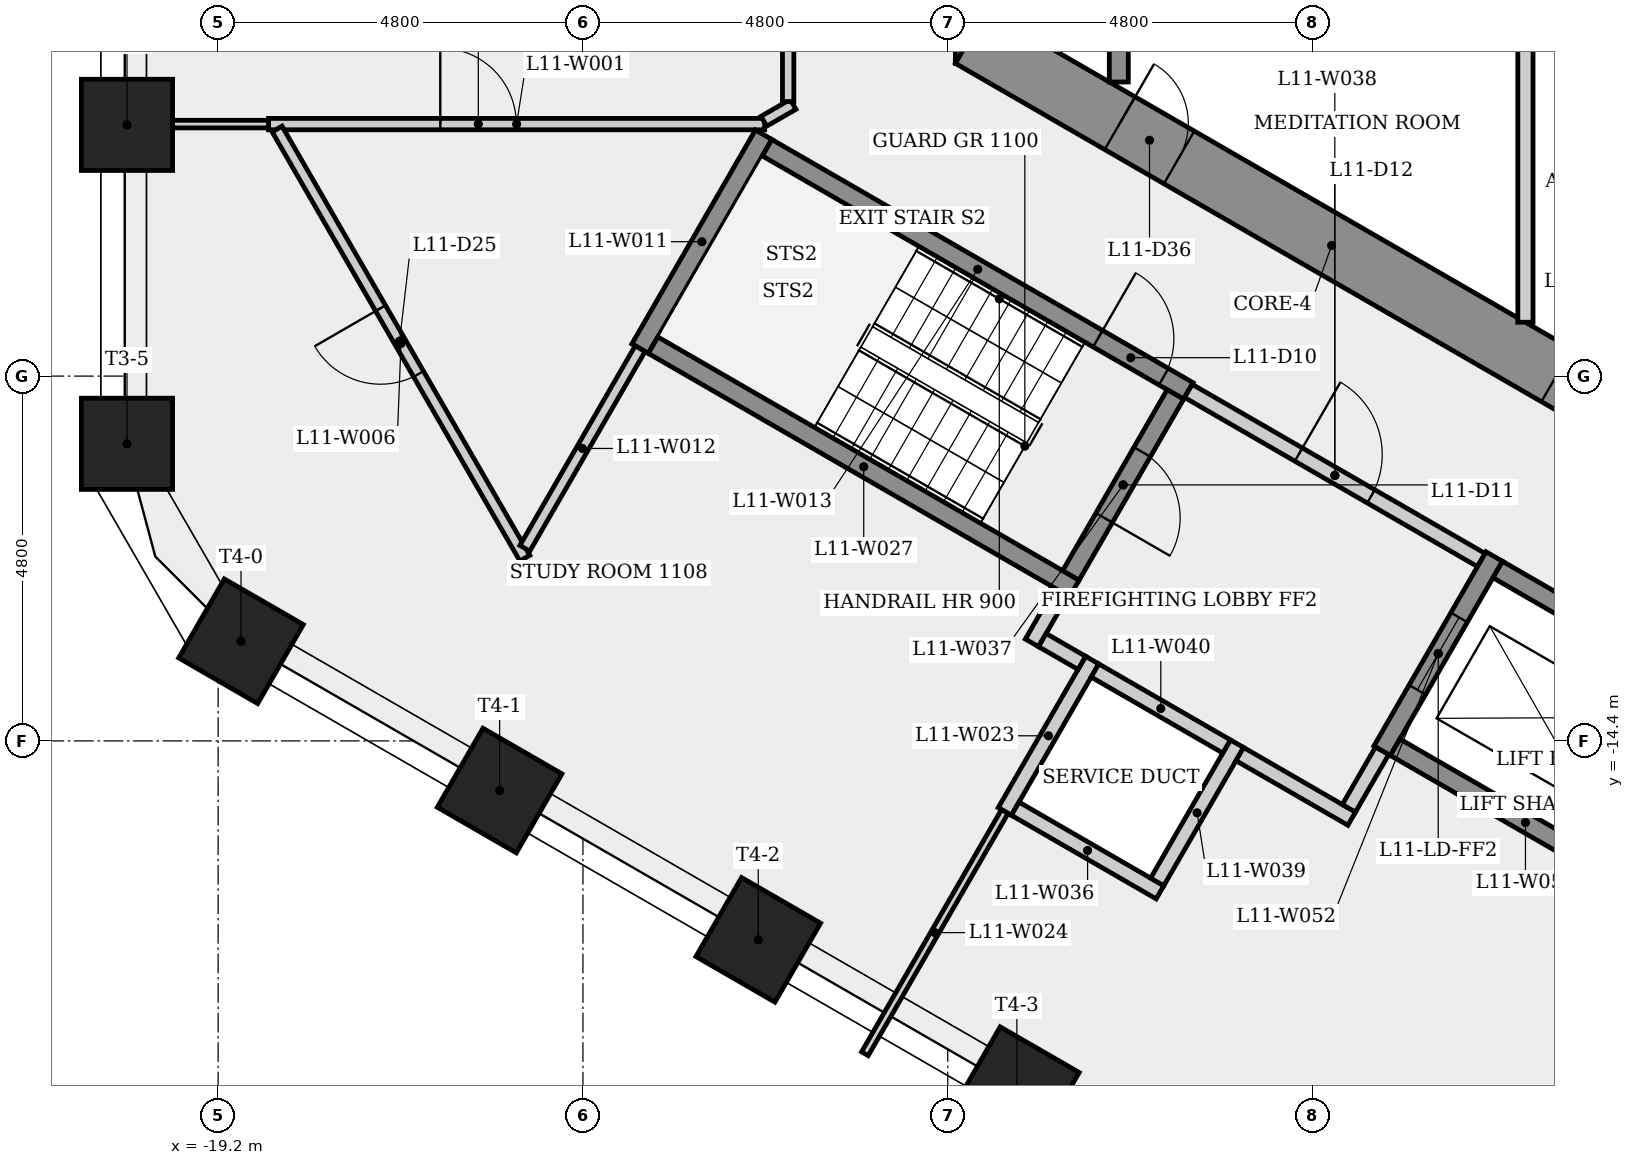
"""IFC4 building model, lengths in metres.
Left out: names, types, materials, properties, quantities, classifications, styles, units other than length and angle.
Written with IfcOpenShell. Run it as: python <this file> out.ifc"""

import sys

from ifc_helpers import new_model, si_unit, direction, frame, frame_2d, origin, origin_2d, place, context, subcontext, project, spatial, rectangle, extrude, element, fill, save


model = new_model("IFC4")
c1 = context("Model", 3, precision=1e-05, world=origin(), true_north=direction((0.0, 1.0)))
c2 = subcontext(c1, "Body", "Model", "MODEL_VIEW")
j1 = project(units=[si_unit("LENGTHUNIT", "METRE"), si_unit("PLANEANGLEUNIT", "RADIAN")], contexts=[c1])
p1 = place(None, origin())
s1 = spatial("IfcSite", under=j1, at=p1, CompositionType="ELEMENT")
p2 = place(p1, origin())
s2 = spatial("IfcBuilding", under=s1, at=p2, CompositionType="ELEMENT")
p3 = place(p2, frame((0.0, 0.0, 45.9)))
s3 = spatial("IfcBuildingStorey", under=s2, at=p3, CompositionType="ELEMENT", Elevation=45.9)
p4 = place(p3, frame((-9.1, 5.485, 0.0), z_axis=(0.0, 0.0, 1.0), x_axis=(0.0, -1.0, 0.0)))
e1 = element("IfcWall", 1, at=p4, inside=s3, PredefinedType="SHEAR", context=c2, shape_type="SweptSolid", body=[
    extrude(rectangle(XDim=10.97, YDim=0.8, at=frame_2d((5.485, 0.0))), origin(), (0.0, 0.0, 1.0), 3.4),
])
p5 = place(p4, frame((4.685, 0.0, 0.0)))
e2 = element("IfcOpeningElement", 2, at=p5, cuts=e1, PredefinedType="OPENING", context=c2, shape_type="SweptSolid", body=[
    extrude(rectangle(XDim=1.6, YDim=2.1, at=frame_2d((0.8, 1.05))), frame((0.0, 0.41, 0.0), z_axis=(0.0, -1.0, 0.0), x_axis=(1.0, 0.0, 0.0)), (0.0, 0.0, 1.0), 0.82),
])
p6 = place(p3, frame((-9.3, -5.138, 0.0), z_axis=(0.0, 0.0, 1.0), x_axis=(0.866023993627, -0.500002442456, 0.0)))
e3 = element("IfcWall", 3, at=p6, inside=s3, PredefinedType="SHEAR", context=c2, shape_type="SweptSolid", body=[
    extrude(rectangle(XDim=10.97, YDim=0.8, at=frame_2d((5.485, 0.0))), origin(), (0.0, 0.0, 1.0), 3.4),
])
p7 = place(p6, frame((2.268, 0.0, 0.0)))
e4 = element("IfcOpeningElement", 4, at=p7, cuts=e3, PredefinedType="OPENING", context=c2, shape_type="SweptSolid", body=[
    extrude(rectangle(XDim=0.9, YDim=2.1, at=frame_2d((0.45, 1.05))), frame((0.0, 0.41, 0.0), z_axis=(0.0, -1.0, 0.0), x_axis=(1.0, 0.0, 0.0)), (0.0, 0.0, 1.0), 0.82),
])
p8 = place(p6, frame((8.903, 0.0, 0.0)))
e5 = element("IfcOpeningElement", 5, at=p8, cuts=e3, PredefinedType="OPENING", context=c2, shape_type="SweptSolid", body=[
    extrude(rectangle(XDim=0.9, YDim=2.1, at=frame_2d((0.45, 1.05))), frame((0.0, 0.41, 0.0), z_axis=(0.0, -1.0, 0.0), x_axis=(1.0, 0.0, 0.0)), (0.0, 0.0, 1.0), 0.82),
])
for number, where, z_axis, x_axis in (
    (6, (-20.399, -6.294, 0.0), (0.0, 0.0, 1.0), (-1.0, 0.0, 0.0)),
    (7, (-20.399, -10.491, 0.0), (0.0, 0.0, 1.0), (-1.0, 0.0, 0.0)),
    (8, (-18.899, -13.089, 0.0), (0.0, 0.0, 1.0), (-0.5, -0.866, 0.0)),
    (9, (-15.496, -15.053, 0.0), (0.0, 0.0, 1.0), (-0.5, -0.866, 0.0)),
    (10, (-12.094, -17.018, 0.0), (0.0, 0.0, 1.0), (-0.5, -0.866, 0.0)),
    (11, (-8.691, -18.982, 0.0), (0.0, 0.0, 1.0), (-0.5, -0.866, 0.0)),
):
    element("IfcColumn", number, at=place(p3, frame(where, z_axis=z_axis, x_axis=x_axis)), inside=s3, PredefinedType="COLUMN", context=c2, shape_type="SweptSolid", body=[
        extrude(rectangle(XDim=1.2, YDim=1.2, at=origin_2d()), origin(), (0.0, 0.0, 1.0), 3.4),
    ])
p9 = place(p3, frame((-18.537, -6.284, 0.0), z_axis=(0.0, 0.0, 1.0), x_axis=(1.0, 0.0, 0.0)))
e12 = element("IfcWall", 12, at=p9, inside=s3, PredefinedType="PARTITIONING", context=c2, shape_type="SweptSolid", body=[
    extrude(rectangle(XDim=6.527, YDim=0.15, at=frame_2d((3.264, 0.0))), origin(), (0.0, 0.0, 1.0), 3.05),
])
p10 = place(p9, frame((2.26, 0.0, 0.0)))
e13 = element("IfcOpeningElement", 13, at=p10, cuts=e12, PredefinedType="OPENING", context=c2, shape_type="SweptSolid", body=[
    extrude(rectangle(XDim=1.0, YDim=2.1, at=frame_2d((0.5, 1.05))), frame((0.0, 0.085, 0.0), z_axis=(0.0, -1.0, 0.0), x_axis=(1.0, 0.0, 0.0)), (0.0, 0.0, 1.0), 0.17),
])
p11 = place(p3, frame((-18.537, -6.284, 0.0), z_axis=(0.0, 0.0, 1.0), x_axis=(-1.0, 0.0, 0.0)))
e14 = element("IfcWall", 14, at=p11, inside=s3, PredefinedType="PARTITIONING", context=c2, shape_type="SweptSolid", body=[
    extrude(rectangle(XDim=1.892, YDim=0.1, at=frame_2d((0.946, 0.0))), origin(), (0.0, 0.0, 1.0), 3.05),
])
p12 = place(p3, frame((-15.164, -11.995, 0.0), z_axis=(0.0, 0.0, 1.0), x_axis=(-0.499989336744, 0.866031560131, 0.0)))
e15 = element("IfcWall", 15, at=p12, inside=s3, PredefinedType="PARTITIONING", context=c2, shape_type="SweptSolid", body=[
    extrude(rectangle(XDim=6.52, YDim=0.15, at=frame_2d((3.26, 0.0))), origin(), (0.0, 0.0, 1.0), 3.05),
])
p13 = place(p12, frame((2.797, 0.0, 0.0)))
e16 = element("IfcOpeningElement", 16, at=p13, cuts=e15, PredefinedType="OPENING", context=c2, shape_type="SweptSolid", body=[
    extrude(rectangle(XDim=1.0, YDim=2.1, at=frame_2d((0.5, 1.05))), frame((0.0, 0.085, 0.0), z_axis=(0.0, -1.0, 0.0), x_axis=(1.0, 0.0, 0.0)), (0.0, 0.0, 1.0), 0.17),
])
p14 = place(p3, frame((-13.648, -9.239, 0.0), z_axis=(0.0, 0.0, 1.0), x_axis=(0.500017246033, 0.866015446554, 0.0)))
e17 = element("IfcWall", 17, at=p14, inside=s3, PredefinedType="SHEAR", context=c2, shape_type="SweptSolid", body=[
    extrude(rectangle(XDim=3.25, YDim=0.25, at=frame_2d((1.625, 0.0))), origin(), (0.0, 0.0, 1.0), 3.05),
])
p15 = place(p3, frame((-13.648, -9.239, 0.0), z_axis=(0.0, 0.0, 1.0), x_axis=(-0.500017413604, -0.866015349802, 0.0)))
e18 = element("IfcWall", 18, at=p15, inside=s3, PredefinedType="PARTITIONING", context=c2, shape_type="SweptSolid", body=[
    extrude(rectangle(XDim=3.033, YDim=0.15, at=frame_2d((1.517, 0.0))), origin(), (0.0, 0.0, 1.0), 3.05),
])
p16 = place(p3, frame((-11.977, -6.595, 0.0), z_axis=(0.0, 0.0, 1.0), x_axis=(0.866025499775, -0.499999833739, 0.0)))
e19 = element("IfcWall", 19, at=p16, inside=s3, PredefinedType="SHEAR", context=c2, shape_type="SweptSolid", body=[
    extrude(rectangle(XDim=6.4, YDim=0.25, at=frame_2d((3.2, 0.0))), origin(), (0.0, 0.0, 1.0), 3.05),
])
p17 = place(p16, frame((5.025, 0.0, 0.0)))
e20 = element("IfcOpeningElement", 20, at=p17, cuts=e19, PredefinedType="OPENING", context=c2, shape_type="SweptSolid", body=[
    extrude(rectangle(XDim=1.0, YDim=2.1, at=frame_2d((0.5, 1.05))), frame((0.0, 0.135, 0.0), z_axis=(0.0, -1.0, 0.0), x_axis=(1.0, 0.0, 0.0)), (0.0, 0.0, 1.0), 0.27),
])
p18 = place(p3, frame((-12.02, -6.247, 0.0), z_axis=(0.0, 0.0, 1.0), x_axis=(0.866103179807, 0.499865263774, 0.0)))
e21 = element("IfcWall", 21, at=p18, inside=s3, PredefinedType="PARTITIONING", context=c2, shape_type="SweptSolid", body=[
    extrude(rectangle(XDim=0.444, YDim=0.15, at=frame_2d((0.222, 0.0))), origin(), (0.0, 0.0, 1.0), 3.05),
])
p19 = place(p3, frame((-11.7, 6.137, 0.0), z_axis=(0.0, 0.0, 1.0), x_axis=(0.0, -1.0, 0.0)))
e22 = element("IfcWall", 22, at=p19, inside=s3, PredefinedType="PARTITIONING", context=c2, shape_type="SweptSolid", body=[
    extrude(rectangle(XDim=12.125, YDim=0.15, at=frame_2d((6.062, 0.0))), origin(), (0.0, 0.0, 1.0), 3.05),
])
p20 = place(p19, frame((5.637, 0.0, 0.0)))
e23 = element("IfcOpeningElement", 23, at=p20, cuts=e22, PredefinedType="OPENING", context=c2, shape_type="SweptSolid", body=[
    extrude(rectangle(XDim=1.0, YDim=2.1, at=frame_2d((0.5, 1.05))), frame((0.0, 0.085, 0.0), z_axis=(0.0, -1.0, 0.0), x_axis=(1.0, 0.0, 0.0)), (0.0, 0.0, 1.0), 0.17),
])
p21 = place(p3, frame((-8.85, -15.329, 0.0), z_axis=(0.0, 0.0, 1.0), x_axis=(0.500077740698, 0.865980515519, 0.0)))
e24 = element("IfcWall", 24, at=p21, inside=s3, PredefinedType="PLUMBINGWALL", context=c2, shape_type="SweptSolid", body=[
    extrude(rectangle(XDim=2.3, YDim=0.2, at=frame_2d((1.15, 0.0))), origin(), (0.0, 0.0, 1.0), 3.05),
])
p22 = place(p3, frame((-8.85, -15.329, 0.0), z_axis=(0.0, 0.0, 1.0), x_axis=(-0.499955964762, -0.866050826049, 0.0)))
e25 = element("IfcWall", 25, at=p22, inside=s3, PredefinedType="PARTITIONING", context=c2, shape_type="SweptSolid", body=[
    extrude(rectangle(XDim=3.68, YDim=0.1, at=frame_2d((1.84, 0.0))), origin(), (0.0, 0.0, 1.0), 3.05),
])
p23 = place(p3, frame((-8.493, -13.11, 0.0), z_axis=(0.0, 0.0, 1.0), x_axis=(0.500067724834, 0.865986299303, 0.0)))
e26 = element("IfcWall", 26, at=p23, inside=s3, PredefinedType="PARTITIONING", context=c2, shape_type="SweptSolid", body=[
    extrude(rectangle(XDim=0.775, YDim=0.2, at=frame_2d((0.388, 0.0))), origin(), (0.0, 0.0, 1.0), 3.05),
])
p24 = place(p3, frame((-7.935, -12.393, 0.0), z_axis=(0.0, 0.0, 1.0), x_axis=(-0.866025499775, 0.499999833739, 0.0)))
e27 = element("IfcWall", 27, at=p24, inside=s3, PredefinedType="SHEAR", context=c2, shape_type="SweptSolid", body=[
    extrude(rectangle(XDim=6.4, YDim=0.25, at=frame_2d((3.2, 0.0))), origin(), (0.0, 0.0, 1.0), 3.05),
])
p25 = place(p3, frame((-7.836, -13.373, 0.0), z_axis=(0.0, 0.0, 1.0), x_axis=(-0.866232998003, 0.499640263761, 0.0)))
e28 = element("IfcWall", 28, at=p25, inside=s3, PredefinedType="PARTITIONING", context=c2, shape_type="SweptSolid", body=[
    extrude(rectangle(XDim=0.6, YDim=0.2, at=frame_2d((0.3, 0.0))), origin(), (0.0, 0.0, 1.0), 3.05),
])
p26 = place(p3, frame((-7.35, -5.73, 0.0), z_axis=(0.0, 0.0, 1.0), x_axis=(0.0, 1.0, 0.0)))
e29 = element("IfcWall", 29, at=p26, inside=s3, PredefinedType="SHEAR", context=c2, shape_type="SweptSolid", body=[
    extrude(rectangle(XDim=4.055, YDim=0.25, at=frame_2d((2.028, 0.0))), origin(), (0.0, 0.0, 1.0), 3.05),
])
p27 = place(p3, frame((-6.808, -16.392, 0.0), z_axis=(0.0, 0.0, 1.0), x_axis=(-0.866008176907, 0.50002983664, 0.0)))
e30 = element("IfcWall", 30, at=p27, inside=s3, PredefinedType="PLUMBINGWALL", context=c2, shape_type="SweptSolid", body=[
    extrude(rectangle(XDim=2.2, YDim=0.2, at=frame_2d((1.1, 0.0))), origin(), (0.0, 0.0, 1.0), 3.05),
])
p28 = place(p3, frame((-6.605, -9.841, 0.0), z_axis=(0.0, 0.0, 1.0), x_axis=(-0.499996545922, -0.866027397988, 0.0)))
e31 = element("IfcWall", 31, at=p28, inside=s3, PredefinedType="SHEAR", context=c2, shape_type="SweptSolid", body=[
    extrude(rectangle(XDim=2.75, YDim=0.25, at=frame_2d((1.375, 0.0))), origin(), (0.0, 0.0, 1.0), 3.05),
])
p29 = place(p28, frame((0.875, 0.0, 0.0)))
e32 = element("IfcOpeningElement", 32, at=p29, cuts=e31, PredefinedType="OPENING", context=c2, shape_type="SweptSolid", body=[
    extrude(rectangle(XDim=1.0, YDim=2.1, at=frame_2d((0.5, 1.05))), frame((0.0, 0.135, 0.0), z_axis=(0.0, -1.0, 0.0), x_axis=(1.0, 0.0, 0.0)), (0.0, 0.0, 1.0), 0.27),
])
p30 = place(p3, frame((-6.435, -9.795, 0.0), z_axis=(0.0, 0.0, 1.0), x_axis=(0.866012907634, -0.500021643343, 0.0)))
e33 = element("IfcWall", 33, at=p30, inside=s3, PredefinedType="PARTITIONING", context=c2, shape_type="SweptSolid", body=[
    extrude(rectangle(XDim=4.45, YDim=0.2, at=frame_2d((2.225, 0.0))), origin(), (0.0, 0.0, 1.0), 3.05),
])
p31 = place(p30, frame((1.675, 0.0, 0.0)))
e34 = element("IfcOpeningElement", 34, at=p31, cuts=e33, PredefinedType="OPENING", context=c2, shape_type="SweptSolid", body=[
    extrude(rectangle(XDim=1.1, YDim=2.1, at=frame_2d((0.55, 1.05))), frame((0.0, 0.11, 0.0), z_axis=(0.0, -1.0, 0.0), x_axis=(1.0, 0.0, 0.0)), (0.0, 0.0, 1.0), 0.22),
])
p32 = place(p3, frame((-5.795, -14.437, 0.0), z_axis=(0.0, 0.0, 1.0), x_axis=(-0.500027713859, -0.866009402589, 0.0)))
e35 = element("IfcWall", 35, at=p32, inside=s3, PredefinedType="PLUMBINGWALL", context=c2, shape_type="SweptSolid", body=[
    extrude(rectangle(XDim=2.1, YDim=0.2, at=frame_2d((1.05, 0.0))), origin(), (0.0, 0.0, 1.0), 3.05),
])
p33 = place(p3, frame((-5.931, -14.473, 0.0), z_axis=(0.0, 0.0, 1.0), x_axis=(-0.866041268327, 0.499972520799, 0.0)))
e36 = element("IfcWall", 36, at=p33, inside=s3, PredefinedType="PLUMBINGWALL", context=c2, shape_type="SweptSolid", body=[
    extrude(rectangle(XDim=2.0, YDim=0.2, at=frame_2d((1.0, 0.0))), origin(), (0.0, 0.0, 1.0), 3.05),
])
p34 = place(p3, frame((-4.286, -15.423, 0.0), z_axis=(0.0, 0.0, 1.0), x_axis=(-0.866025371046, 0.500000056704, 0.0)))
e37 = element("IfcWall", 37, at=p34, inside=s3, PredefinedType="PARTITIONING", context=c2, shape_type="SweptSolid", body=[
    extrude(rectangle(XDim=1.7, YDim=0.2, at=frame_2d((0.85, 0.0))), origin(), (0.0, 0.0, 1.0), 3.05),
])
p35 = place(p3, frame((-3.885, -14.529, 0.0), z_axis=(0.0, 0.0, 1.0), x_axis=(-0.499859285417, -0.866106630146, 0.0)))
e38 = element("IfcWall", 38, at=p35, inside=s3, PredefinedType="PARTITIONING", context=c2, shape_type="SweptSolid", body=[
    extrude(rectangle(XDim=0.875, YDim=0.2, at=frame_2d((0.438, 0.0))), origin(), (0.0, 0.0, 1.0), 3.05),
])
p36 = place(p3, frame((-2.41, -11.974, 0.0), z_axis=(0.0, 0.0, 1.0), x_axis=(-0.500001826776, -0.866024349092, 0.0)))
e39 = element("IfcWall", 39, at=p36, inside=s3, PredefinedType="SHEAR", context=c2, shape_type="SweptSolid", body=[
    extrude(rectangle(XDim=2.95, YDim=0.25, at=frame_2d((1.475, 0.0))), origin(), (0.0, 0.0, 1.0), 3.05),
])
p37 = place(p36, frame((0.925, 0.0, 0.0)))
e40 = element("IfcOpeningElement", 40, at=p37, cuts=e39, PredefinedType="OPENING", context=c2, shape_type="SweptSolid", body=[
    extrude(rectangle(XDim=1.1, YDim=2.1, at=frame_2d((0.55, 1.05))), frame((0.0, 0.135, 0.0), z_axis=(0.0, -1.0, 0.0), x_axis=(1.0, 0.0, 0.0)), (0.0, 0.0, 1.0), 0.27),
])
p38 = place(p3, frame((-2.364, -12.145, 0.0), z_axis=(0.0, 0.0, 1.0), x_axis=(0.86603892542, -0.499976579108, 0.0)))
e41 = element("IfcWall", 41, at=p38, inside=s3, PredefinedType="SHEAR", context=c2, shape_type="SweptSolid", body=[
    extrude(rectangle(XDim=2.162, YDim=0.25, at=frame_2d((1.081, 0.0))), origin(), (0.0, 0.0, 1.0), 3.05),
])
p39 = place(p3, frame((-2.0, -5.275, 0.0), z_axis=(0.0, 0.0, 1.0), x_axis=(0.0, -1.0, 0.0)))
e42 = element("IfcWall", 42, at=p39, inside=s3, PredefinedType="PARTITIONING", context=c2, shape_type="SweptSolid", body=[
    extrude(rectangle(XDim=3.616, YDim=0.2, at=frame_2d((1.808, 0.0))), origin(), (0.0, 0.0, 1.0), 3.05),
])
p40 = place(p3, frame((-0.856, -16.133, 0.0), z_axis=(0.0, 0.0, 1.0), x_axis=(-0.866021716278, 0.500006386895, 0.0)))
e43 = element("IfcWall", 43, at=p40, inside=s3, PredefinedType="SHEAR", context=c2, shape_type="SweptSolid", body=[
    extrude(rectangle(XDim=3.3, YDim=0.25, at=frame_2d((1.65, 0.0))), origin(), (0.0, 0.0, 1.0), 3.05),
])
p41 = place(p17, origin())
e44 = element("IfcDoor", 44, at=p41, inside=s3, OperationType="SINGLE_SWING_LEFT", PredefinedType="DOOR", context=c2, shape_type="SweptSolid", body=[
    extrude(rectangle(XDim=1.0, YDim=2.1, at=frame_2d((0.5, 1.05))), frame((0.0, 0.025, 0.0), z_axis=(0.0, -1.0, 0.0), x_axis=(1.0, 0.0, 0.0)), (0.0, 0.0, 1.0), 0.05),
])
fill(e20, e44)
p42 = place(p29, origin())
e45 = element("IfcDoor", 45, at=p42, inside=s3, OperationType="SINGLE_SWING_RIGHT", PredefinedType="DOOR", context=c2, shape_type="SweptSolid", body=[
    extrude(rectangle(XDim=1.0, YDim=2.1, at=frame_2d((0.5, 1.05))), frame((0.0, 0.025, 0.0), z_axis=(0.0, -1.0, 0.0), x_axis=(1.0, 0.0, 0.0)), (0.0, 0.0, 1.0), 0.05),
])
fill(e32, e45)
p43 = place(p31, origin())
e46 = element("IfcDoor", 46, at=p43, inside=s3, OperationType="SINGLE_SWING_LEFT", PredefinedType="DOOR", context=c2, shape_type="SweptSolid", body=[
    extrude(rectangle(XDim=1.1, YDim=2.1, at=frame_2d((0.55, 1.05))), frame((0.0, 0.025, 0.0), z_axis=(0.0, -1.0, 0.0), x_axis=(1.0, 0.0, 0.0)), (0.0, 0.0, 1.0), 0.05),
])
fill(e34, e46)
p44 = place(p37, origin())
e47 = element("IfcDoor", 47, at=p44, inside=s3, OperationType="SLIDING_TO_LEFT", PredefinedType="DOOR", context=c2, shape_type="SweptSolid", body=[
    extrude(rectangle(XDim=1.1, YDim=2.1, at=frame_2d((0.55, 1.05))), frame((0.0, 0.025, 0.0), z_axis=(0.0, -1.0, 0.0), x_axis=(1.0, 0.0, 0.0)), (0.0, 0.0, 1.0), 0.05),
])
fill(e40, e47)
p45 = place(p10, origin())
e48 = element("IfcDoor", 48, at=p45, inside=s3, OperationType="SINGLE_SWING_LEFT", PredefinedType="DOOR", context=c2, shape_type="SweptSolid", body=[
    extrude(rectangle(XDim=1.0, YDim=2.1, at=frame_2d((0.5, 1.05))), frame((0.0, 0.025, 0.0), z_axis=(0.0, -1.0, 0.0), x_axis=(1.0, 0.0, 0.0)), (0.0, 0.0, 1.0), 0.05),
])
fill(e13, e48)
p46 = place(p13, origin())
e49 = element("IfcDoor", 49, at=p46, inside=s3, OperationType="SINGLE_SWING_RIGHT", PredefinedType="DOOR", context=c2, shape_type="SweptSolid", body=[
    extrude(rectangle(XDim=1.0, YDim=2.1, at=frame_2d((0.5, 1.05))), frame((0.0, 0.025, 0.0), z_axis=(0.0, -1.0, 0.0), x_axis=(1.0, 0.0, 0.0)), (0.0, 0.0, 1.0), 0.05),
])
fill(e16, e49)
p47 = place(p7, origin())
e50 = element("IfcDoor", 50, at=p47, inside=s3, OperationType="SINGLE_SWING_LEFT", PredefinedType="DOOR", context=c2, shape_type="SweptSolid", body=[
    extrude(rectangle(XDim=0.9, YDim=2.1, at=frame_2d((0.45, 1.05))), frame((0.0, 0.025, 0.0), z_axis=(0.0, -1.0, 0.0), x_axis=(1.0, 0.0, 0.0)), (0.0, 0.0, 1.0), 0.05),
])
fill(e4, e50)
save(model, sys.argv[1])
